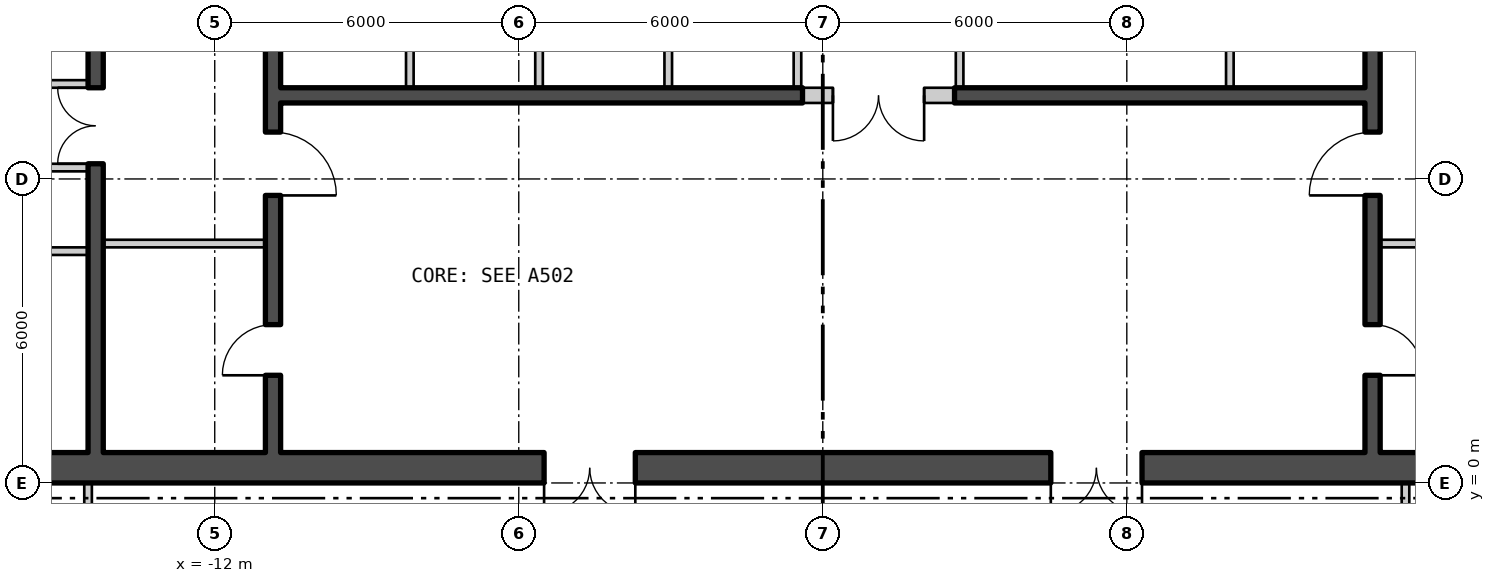
"""IFC4 building model, lengths in metres.
Left out: names, types, materials, properties, quantities, classifications, styles, units other than length and angle.
Written with IfcOpenShell. Run it as: python <this file> out.ifc"""

import sys

from ifc_helpers import new_model, si_unit, direction, frame, frame_2d, origin, place, context, subcontext, project, spatial, rectangle, extrude, element, fill, save


model = new_model("IFC4")
c1 = context("Model", 3, precision=1e-05, world=origin(), true_north=direction((0.0, 1.0)))
c2 = subcontext(c1, "Body", "Model", "MODEL_VIEW")
j1 = project(units=[si_unit("LENGTHUNIT", "METRE"), si_unit("PLANEANGLEUNIT", "RADIAN")], contexts=[c1])
p1 = place(None, origin())
s1 = spatial("IfcSite", under=j1, at=p1, CompositionType="ELEMENT")
p2 = place(p1, origin())
s2 = spatial("IfcBuilding", under=s1, at=p2, CompositionType="ELEMENT")
p3 = place(p2, frame((0.0, 0.0, -11.4)))
s3 = spatial("IfcBuildingStorey", under=s2, at=p3, CompositionType="ELEMENT", Elevation=-11.4)
p4 = place(p3, frame((-17.5, 0.3, 0.0), z_axis=(0.0, 0.0, 1.0), x_axis=(1.0, 0.0, 0.0)))
e1 = element("IfcWall", 1, at=p4, inside=s3, PredefinedType="SHEAR", context=c2, shape_type="SweptSolid", body=[
    extrude(rectangle(XDim=35.0, YDim=0.6, at=frame_2d((17.5, 0.0))), origin(), (0.0, 0.0, 1.0), 5.25),
])
p5 = place(p4, frame((12.0, 0.0, 0.0)))
e2 = element("IfcOpeningElement", 2, at=p5, cuts=e1, PredefinedType="OPENING", context=c2, shape_type="SweptSolid", body=[
    extrude(rectangle(XDim=1.8, YDim=2.4, at=frame_2d((0.9, 1.2))), frame((0.0, 0.31, 0.0), z_axis=(0.0, -1.0, 0.0), x_axis=(1.0, 0.0, 0.0)), (0.0, 0.0, 1.0), 0.62),
])
p6 = place(p4, frame((22.0, 0.0, 0.0)))
e3 = element("IfcOpeningElement", 3, at=p6, cuts=e1, PredefinedType="OPENING", context=c2, shape_type="SweptSolid", body=[
    extrude(rectangle(XDim=1.8, YDim=2.4, at=frame_2d((0.9, 1.2))), frame((0.0, 0.31, 0.0), z_axis=(0.0, -1.0, 0.0), x_axis=(1.0, 0.0, 0.0)), (0.0, 0.0, 1.0), 0.62),
])
p7 = place(p3, frame((-10.85, 0.6, 0.0), z_axis=(0.0, 0.0, 1.0), x_axis=(0.0, 1.0, 0.0)))
e4 = element("IfcWall", 4, at=p7, inside=s3, PredefinedType="SHEAR", context=c2, shape_type="SweptSolid", body=[
    extrude(rectangle(XDim=16.8, YDim=0.3, at=frame_2d((8.4, 0.0))), origin(), (0.0, 0.0, 1.0), 5.25),
])
p8 = place(p7, frame((5.075, 0.0, 0.0)))
e5 = element("IfcOpeningElement", 5, at=p8, cuts=e4, PredefinedType="OPENING", context=c2, shape_type="SweptSolid", body=[
    extrude(rectangle(XDim=1.25, YDim=2.1, at=frame_2d((0.625, 1.05))), frame((0.0, 0.16, 0.0), z_axis=(0.0, -1.0, 0.0), x_axis=(1.0, 0.0, 0.0)), (0.0, 0.0, 1.0), 0.32),
])
p9 = place(p7, frame((1.525, 0.0, 0.0)))
e6 = element("IfcOpeningElement", 6, at=p9, cuts=e4, PredefinedType="OPENING", context=c2, shape_type="SweptSolid", body=[
    extrude(rectangle(XDim=1.0, YDim=2.1, at=frame_2d((0.5, 1.05))), frame((0.0, 0.16, 0.0), z_axis=(0.0, -1.0, 0.0), x_axis=(1.0, 0.0, 0.0)), (0.0, 0.0, 1.0), 0.32),
])
p10 = place(p3, frame((-14.35, 0.6, 0.0), z_axis=(0.0, 0.0, 1.0), x_axis=(0.0, 1.0, 0.0)))
e7 = element("IfcWall", 7, at=p10, inside=s3, PredefinedType="SHEAR", context=c2, shape_type="SweptSolid", body=[
    extrude(rectangle(XDim=16.8, YDim=0.3, at=frame_2d((8.4, 0.0))), origin(), (0.0, 0.0, 1.0), 5.25),
])
p11 = place(p10, frame((5.7, 0.0, 0.0)))
e8 = element("IfcOpeningElement", 8, at=p11, cuts=e7, PredefinedType="OPENING", context=c2, shape_type="SweptSolid", body=[
    extrude(rectangle(XDim=1.5, YDim=2.1, at=frame_2d((0.75, 1.05))), frame((0.0, 0.16, 0.0), z_axis=(0.0, -1.0, 0.0), x_axis=(1.0, 0.0, 0.0)), (0.0, 0.0, 1.0), 0.32),
])
p12 = place(p3, frame((10.85, 0.6, 0.0), z_axis=(0.0, 0.0, 1.0), x_axis=(0.0, 1.0, 0.0)))
e9 = element("IfcWall", 9, at=p12, inside=s3, PredefinedType="SHEAR", context=c2, shape_type="SweptSolid", body=[
    extrude(rectangle(XDim=16.8, YDim=0.3, at=frame_2d((8.4, 0.0))), origin(), (0.0, 0.0, 1.0), 5.25),
])
p13 = place(p12, frame((5.075, 0.0, 0.0)))
e10 = element("IfcOpeningElement", 10, at=p13, cuts=e9, PredefinedType="OPENING", context=c2, shape_type="SweptSolid", body=[
    extrude(rectangle(XDim=1.25, YDim=2.1, at=frame_2d((0.625, 1.05))), frame((0.0, 0.16, 0.0), z_axis=(0.0, -1.0, 0.0), x_axis=(1.0, 0.0, 0.0)), (0.0, 0.0, 1.0), 0.32),
])
p14 = place(p12, frame((1.525, 0.0, 0.0)))
e11 = element("IfcOpeningElement", 11, at=p14, cuts=e9, PredefinedType="OPENING", context=c2, shape_type="SweptSolid", body=[
    extrude(rectangle(XDim=1.0, YDim=2.1, at=frame_2d((0.5, 1.05))), frame((0.0, 0.16, 0.0), z_axis=(0.0, -1.0, 0.0), x_axis=(1.0, 0.0, 0.0)), (0.0, 0.0, 1.0), 0.32),
])
p15 = place(p3, frame((-10.7, 7.65, 0.0), z_axis=(0.0, 0.0, 1.0), x_axis=(1.0, 0.0, 0.0)))
e12 = element("IfcWall", 12, at=p15, inside=s3, PredefinedType="SHEAR", context=c2, shape_type="SweptSolid", body=[
    extrude(rectangle(XDim=10.3, YDim=0.3, at=frame_2d((5.15, 0.0))), origin(), (0.0, 0.0, 1.0), 5.25),
])
p16 = place(p3, frame((2.6, 7.65, 0.0), z_axis=(0.0, 0.0, 1.0), x_axis=(1.0, 0.0, 0.0)))
e13 = element("IfcWall", 13, at=p16, inside=s3, PredefinedType="SHEAR", context=c2, shape_type="SweptSolid", body=[
    extrude(rectangle(XDim=8.1, YDim=0.3, at=frame_2d((4.05, 0.0))), origin(), (0.0, 0.0, 1.0), 5.25),
])
for number, where, z_axis, x_axis in (
    (14, (-8.15, 7.8, 0.0), (0.0, 0.0, 1.0), (0.0, 1.0, 0.0)),
    (15, (-5.6, 7.8, 0.0), (0.0, 0.0, 1.0), (0.0, 1.0, 0.0)),
    (16, (-3.05, 7.8, 0.0), (0.0, 0.0, 1.0), (0.0, 1.0, 0.0)),
    (17, (-0.5, 7.8, 0.0), (0.0, 0.0, 1.0), (0.0, 1.0, 0.0)),
    (18, (2.7, 7.8, 0.0), (0.0, 0.0, 1.0), (0.0, 1.0, 0.0)),
    (19, (8.033, 7.8, 0.0), (0.0, 0.0, 1.0), (0.0, 1.0, 0.0)),
):
    element("IfcWall", number, at=place(p3, frame(where, z_axis=z_axis, x_axis=x_axis)), inside=s3, PredefinedType="PARTITIONING", context=c2, shape_type="SweptSolid", body=[
        extrude(rectangle(XDim=2.7, YDim=0.15, at=frame_2d((1.35, 0.0))), origin(), (0.0, 0.0, 1.0), 5.25),
    ])
for number, where, z_axis, x_axis in (
    (20, (-14.2, 4.725, 0.0), (0.0, 0.0, 1.0), (1.0, 0.0, 0.0)),
    (21, (11.0, 4.725, 0.0), (0.0, 0.0, 1.0), (1.0, 0.0, 0.0)),
):
    element("IfcWall", number, at=place(p3, frame(where, z_axis=z_axis, x_axis=x_axis)), inside=s3, PredefinedType="PARTITIONING", context=c2, shape_type="SweptSolid", body=[
        extrude(rectangle(XDim=3.2, YDim=0.15, at=frame_2d((1.6, 0.0))), origin(), (0.0, 0.0, 1.0), 5.25),
    ])
for number, where, z_axis, x_axis in (
    (22, (-16.9, 6.225, 0.0), (0.0, 0.0, 1.0), (1.0, 0.0, 0.0)),
    (23, (-16.9, 7.875, 0.0), (0.0, 0.0, 1.0), (1.0, 0.0, 0.0)),
    (24, (-16.9, 4.575, 0.0), (0.0, 0.0, 1.0), (1.0, 0.0, 0.0)),
):
    element("IfcWall", number, at=place(p3, frame(where, z_axis=z_axis, x_axis=x_axis)), inside=s3, PredefinedType="PARTITIONING", context=c2, shape_type="SweptSolid", body=[
        extrude(rectangle(XDim=2.4, YDim=0.15, at=frame_2d((1.2, 0.0))), origin(), (0.0, 0.0, 1.0), 5.25),
    ])
p17 = place(p3, frame((-0.4, 7.65, 0.0), z_axis=(0.0, 0.0, 1.0), x_axis=(1.0, 0.0, 0.0)))
e25 = element("IfcWall", 25, at=p17, inside=s3, PredefinedType="PARTITIONING", context=c2, shape_type="SweptSolid", body=[
    extrude(rectangle(XDim=3.0, YDim=0.3, at=frame_2d((1.5, 0.0))), origin(), (0.0, 0.0, 1.0), 5.25),
])
p18 = place(p17, frame((0.6, 0.0, 0.0)))
e26 = element("IfcOpeningElement", 26, at=p18, cuts=e25, PredefinedType="OPENING", context=c2, shape_type="SweptSolid", body=[
    extrude(rectangle(XDim=1.8, YDim=2.4, at=frame_2d((0.9, 1.2))), frame((0.0, 0.16, 0.0), z_axis=(0.0, -1.0, 0.0), x_axis=(1.0, 0.0, 0.0)), (0.0, 0.0, 1.0), 0.32),
])
p19 = place(p3, frame((-14.5, -2.325, 0.0), z_axis=(0.0, 0.0, 1.0), x_axis=(0.0, 1.0, 0.0)))
e27 = element("IfcWall", 27, at=p19, inside=s3, PredefinedType="PARTITIONING", context=c2, shape_type="SweptSolid", body=[
    extrude(rectangle(XDim=2.325, YDim=0.15, at=frame_2d((1.163, 0.0))), origin(), (0.0, 0.0, 1.0), 5.25),
])
p20 = place(p19, frame((0.662, 0.0, 0.0)))
e28 = element("IfcOpeningElement", 28, at=p20, cuts=e27, PredefinedType="OPENING", context=c2, shape_type="SweptSolid", body=[
    extrude(rectangle(XDim=1.0, YDim=2.1, at=frame_2d((0.5, 1.05))), frame((0.0, 0.085, 0.0), z_axis=(0.0, -1.0, 0.0), x_axis=(1.0, 0.0, 0.0)), (0.0, 0.0, 1.0), 0.17),
])
p21 = place(p3, frame((11.5, -6.075, 0.0), z_axis=(0.0, 0.0, 1.0), x_axis=(0.0, 1.0, 0.0)))
e29 = element("IfcWall", 29, at=p21, inside=s3, PredefinedType="PARTITIONING", context=c2, shape_type="SweptSolid", body=[
    extrude(rectangle(XDim=6.075, YDim=0.15, at=frame_2d((3.038, 0.0))), origin(), (0.0, 0.0, 1.0), 5.25),
])
p22 = place(p21, frame((4.375, 0.0, 0.0)))
e30 = element("IfcOpeningElement", 30, at=p22, cuts=e29, PredefinedType="OPENING", context=c2, shape_type="SweptSolid", body=[
    extrude(rectangle(XDim=1.0, YDim=2.1, at=frame_2d((0.5, 1.05))), frame((0.0, 0.085, 0.0), z_axis=(0.0, -1.0, 0.0), x_axis=(1.0, 0.0, 0.0)), (0.0, 0.0, 1.0), 0.17),
])
p23 = place(p8, origin())
e31 = element("IfcDoor", 31, at=p23, inside=s3, OperationType="SINGLE_SWING_LEFT", PredefinedType="DOOR", context=c2, shape_type="SweptSolid", body=[
    extrude(rectangle(XDim=1.25, YDim=2.1, at=frame_2d((0.625, 1.05))), frame((0.0, 0.025, 0.0), z_axis=(0.0, -1.0, 0.0), x_axis=(1.0, 0.0, 0.0)), (0.0, 0.0, 1.0), 0.05),
])
fill(e5, e31)
p24 = place(p9, origin())
e32 = element("IfcDoor", 32, at=p24, inside=s3, OperationType="SINGLE_SWING_RIGHT", PredefinedType="DOOR", context=c2, shape_type="SweptSolid", body=[
    extrude(rectangle(XDim=1.0, YDim=2.1, at=frame_2d((0.5, 1.05))), frame((0.0, 0.025, 0.0), z_axis=(0.0, -1.0, 0.0), x_axis=(1.0, 0.0, 0.0)), (0.0, 0.0, 1.0), 0.05),
])
fill(e6, e32)
p25 = place(p13, origin())
e33 = element("IfcDoor", 33, at=p25, inside=s3, OperationType="SINGLE_SWING_RIGHT", PredefinedType="DOOR", context=c2, shape_type="SweptSolid", body=[
    extrude(rectangle(XDim=1.25, YDim=2.1, at=frame_2d((0.625, 1.05))), frame((0.0, 0.025, 0.0), z_axis=(0.0, -1.0, 0.0), x_axis=(1.0, 0.0, 0.0)), (0.0, 0.0, 1.0), 0.05),
])
fill(e10, e33)
p26 = place(p14, origin())
e34 = element("IfcDoor", 34, at=p26, inside=s3, OperationType="SINGLE_SWING_LEFT", PredefinedType="DOOR", context=c2, shape_type="SweptSolid", body=[
    extrude(rectangle(XDim=1.0, YDim=2.1, at=frame_2d((0.5, 1.05))), frame((0.0, 0.025, 0.0), z_axis=(0.0, -1.0, 0.0), x_axis=(1.0, 0.0, 0.0)), (0.0, 0.0, 1.0), 0.05),
])
fill(e11, e34)
p27 = place(p11, origin())
e35 = element("IfcDoor", 35, at=p27, inside=s3, OperationType="DOUBLE_DOOR_SINGLE_SWING", PredefinedType="DOOR", context=c2, shape_type="SweptSolid", body=[
    extrude(rectangle(XDim=1.5, YDim=2.1, at=frame_2d((0.75, 1.05))), frame((0.0, 0.025, 0.0), z_axis=(0.0, -1.0, 0.0), x_axis=(1.0, 0.0, 0.0)), (0.0, 0.0, 1.0), 0.05),
])
fill(e8, e35)
p28 = place(p18, origin())
e36 = element("IfcDoor", 36, at=p28, inside=s3, OperationType="DOUBLE_DOOR_SINGLE_SWING", PredefinedType="DOOR", context=c2, shape_type="SweptSolid", body=[
    extrude(rectangle(XDim=1.8, YDim=2.4, at=frame_2d((0.9, 1.2))), frame((0.0, 0.025, 0.0), z_axis=(0.0, -1.0, 0.0), x_axis=(1.0, 0.0, 0.0)), (0.0, 0.0, 1.0), 0.05),
])
fill(e26, e36)
p29 = place(p5, origin())
e37 = element("IfcDoor", 37, at=p29, inside=s3, OperationType="DOUBLE_DOOR_SINGLE_SWING", PredefinedType="DOOR", context=c2, shape_type="SweptSolid", body=[
    extrude(rectangle(XDim=1.8, YDim=2.4, at=frame_2d((0.9, 1.2))), frame((0.0, 0.025, 0.0), z_axis=(0.0, -1.0, 0.0), x_axis=(1.0, 0.0, 0.0)), (0.0, 0.0, 1.0), 0.05),
])
fill(e2, e37)
p30 = place(p6, origin())
e38 = element("IfcDoor", 38, at=p30, inside=s3, OperationType="DOUBLE_DOOR_SINGLE_SWING", PredefinedType="DOOR", context=c2, shape_type="SweptSolid", body=[
    extrude(rectangle(XDim=1.8, YDim=2.4, at=frame_2d((0.9, 1.2))), frame((0.0, 0.025, 0.0), z_axis=(0.0, -1.0, 0.0), x_axis=(1.0, 0.0, 0.0)), (0.0, 0.0, 1.0), 0.05),
])
fill(e3, e38)
save(model, sys.argv[1])
